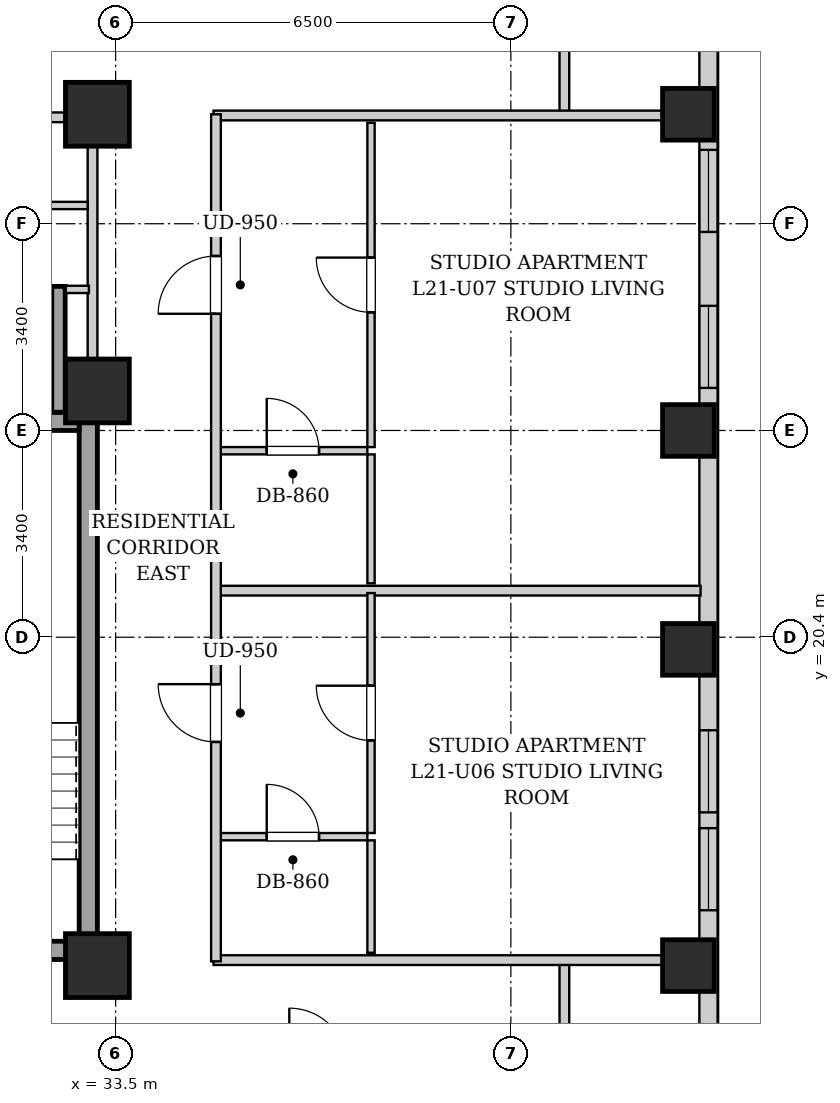
"""IFC4 building model, lengths in metres.
Left out: names, types, materials, properties, quantities, classifications, styles, units other than length and angle.
Written with IfcOpenShell. Run it as: python <this file> out.ifc"""

import sys

from ifc_helpers import new_model, si_unit, direction, frame, frame_2d, origin, origin_2d, place, context, subcontext, project, spatial, rectangle, extrude, element, fill, save


model = new_model("IFC4")
c1 = context("Model", 3, precision=1e-05, world=origin(), true_north=direction((0.0, 1.0)))
c2 = subcontext(c1, "Body", "Model", "MODEL_VIEW")
j1 = project(units=[si_unit("LENGTHUNIT", "METRE"), si_unit("PLANEANGLEUNIT", "RADIAN")], contexts=[c1])
p1 = place(None, origin())
s1 = spatial("IfcSite", under=j1, at=p1, CompositionType="ELEMENT")
p2 = place(p1, origin())
s2 = spatial("IfcBuilding", under=s1, at=p2, CompositionType="ELEMENT")
p3 = place(p2, frame((0.0, 0.0, 78.3)))
s3 = spatial("IfcBuildingStorey", under=s2, at=p3, CompositionType="ELEMENT", Elevation=78.3)
for number, where, z_axis, x_axis in (
    (1, (42.92, 15.0, 0.0), (0.0, 0.0, 1.0), (1.0, 0.0, 0.0)),
    (2, (42.92, 20.2, 0.0), (0.0, 0.0, 1.0), (1.0, 0.0, 0.0)),
    (3, (42.92, 23.8, 0.0), (0.0, 0.0, 1.0), (1.0, 0.0, 0.0)),
    (4, (42.92, 29.0, 0.0), (0.0, 0.0, 1.0), (1.0, 0.0, 0.0)),
):
    element("IfcColumn", number, at=place(p3, frame(where, z_axis=z_axis, x_axis=x_axis)), inside=s3, PredefinedType="COLUMN", context=c2, shape_type="SweptSolid", body=[
        extrude(rectangle(XDim=0.85, YDim=0.85, at=origin_2d()), origin(), (0.0, 0.0, 1.0), 3.2),
    ])
for number, where, z_axis, x_axis in (
    (5, (33.2, 15.0, 0.0), (0.0, 0.0, 1.0), (1.0, 0.0, 0.0)),
    (6, (33.2, 29.0, 0.0), (0.0, 0.0, 1.0), (1.0, 0.0, 0.0)),
    (7, (33.2, 24.45, 0.0), (0.0, 0.0, 1.0), (1.0, 0.0, 0.0)),
):
    element("IfcColumn", number, at=place(p3, frame(where, z_axis=z_axis, x_axis=x_axis)), inside=s3, PredefinedType="COLUMN", context=c2, shape_type="SweptSolid", body=[
        extrude(rectangle(XDim=1.05, YDim=1.05, at=origin_2d()), origin(), (0.0, 0.0, 1.0), 3.2),
    ])
p4 = place(p3, frame((43.25, 40.8, 0.0), z_axis=(0.0, 0.0, 1.0), x_axis=(0.0, -1.0, 0.0)))
e8 = element("IfcWall", 8, at=p4, inside=s3, PredefinedType="SOLIDWALL", context=c2, shape_type="SweptSolid", body=[
    extrude(rectangle(XDim=38.3, YDim=0.3, at=frame_2d((19.15, 0.0))), origin(), (0.0, 0.0, 1.0), 2.94),
])
p5 = place(p4, frame((33.495, 0.0, 0.55)))
e9 = element("IfcOpeningElement", 9, at=p5, cuts=e8, PredefinedType="OPENING", context=c2, shape_type="SweptSolid", body=[
    extrude(rectangle(XDim=1.35, YDim=1.2, at=frame_2d((0.675, 0.6))), frame((0.0, 0.16, 0.0), z_axis=(0.0, -1.0, 0.0), x_axis=(1.0, 0.0, 0.0)), (0.0, 0.0, 1.0), 0.32),
])
p6 = place(p4, frame((31.785, 0.0, 0.55)))
e10 = element("IfcOpeningElement", 10, at=p6, cuts=e8, PredefinedType="OPENING", context=c2, shape_type="SweptSolid", body=[
    extrude(rectangle(XDim=1.35, YDim=1.2, at=frame_2d((0.675, 0.6))), frame((0.0, 0.16, 0.0), z_axis=(0.0, -1.0, 0.0), x_axis=(1.0, 0.0, 0.0)), (0.0, 0.0, 1.0), 0.32),
])
p7 = place(p4, frame((21.93, 0.0, 0.55)))
e11 = element("IfcOpeningElement", 11, at=p7, cuts=e8, PredefinedType="OPENING", context=c2, shape_type="SweptSolid", body=[
    extrude(rectangle(XDim=1.35, YDim=1.2, at=frame_2d((0.675, 0.6))), frame((0.0, 0.16, 0.0), z_axis=(0.0, -1.0, 0.0), x_axis=(1.0, 0.0, 0.0)), (0.0, 0.0, 1.0), 0.32),
])
p8 = place(p4, frame((23.54, 0.0, 0.55)))
e12 = element("IfcOpeningElement", 12, at=p8, cuts=e8, PredefinedType="OPENING", context=c2, shape_type="SweptSolid", body=[
    extrude(rectangle(XDim=1.35, YDim=1.2, at=frame_2d((0.675, 0.6))), frame((0.0, 0.16, 0.0), z_axis=(0.0, -1.0, 0.0), x_axis=(1.0, 0.0, 0.0)), (0.0, 0.0, 1.0), 0.32),
])
p9 = place(p4, frame((14.95, 0.0, 0.55)))
e13 = element("IfcOpeningElement", 13, at=p9, cuts=e8, PredefinedType="OPENING", context=c2, shape_type="SweptSolid", body=[
    extrude(rectangle(XDim=1.35, YDim=1.2, at=frame_2d((0.675, 0.6))), frame((0.0, 0.16, 0.0), z_axis=(0.0, -1.0, 0.0), x_axis=(1.0, 0.0, 0.0)), (0.0, 0.0, 1.0), 0.32),
])
p10 = place(p4, frame((12.385, 0.0, 0.55)))
e14 = element("IfcOpeningElement", 14, at=p10, cuts=e8, PredefinedType="OPENING", context=c2, shape_type="SweptSolid", body=[
    extrude(rectangle(XDim=1.35, YDim=1.2, at=frame_2d((0.675, 0.6))), frame((0.0, 0.16, 0.0), z_axis=(0.0, -1.0, 0.0), x_axis=(1.0, 0.0, 0.0)), (0.0, 0.0, 1.0), 0.32),
])
p11 = place(p3, frame((33.05, 15.1, 0.0), z_axis=(0.0, 0.0, 1.0), x_axis=(0.0, 1.0, 0.0)))
e15 = element("IfcWall", 15, at=p11, inside=s3, PredefinedType="SHEAR", context=c2, shape_type="SweptSolid", body=[
    extrude(rectangle(XDim=9.0, YDim=0.3, at=frame_2d((4.5, 0.0))), origin(), (0.0, 0.0, 1.0), 2.94),
])
p12 = place(p3, frame((30.05, 23.95, 0.0), z_axis=(0.0, 0.0, 1.0), x_axis=(1.0, 0.0, 0.0)))
e16 = element("IfcWall", 16, at=p12, inside=s3, PredefinedType="SHEAR", context=c2, shape_type="SweptSolid", body=[
    extrude(rectangle(XDim=2.85, YDim=0.3, at=frame_2d((1.425, 0.0))), origin(), (0.0, 0.0, 1.0), 2.94),
])
p13 = place(p3, frame((30.05, 15.25, 0.0), z_axis=(0.0, 0.0, 1.0), x_axis=(1.0, 0.0, 0.0)))
e17 = element("IfcWall", 17, at=p13, inside=s3, PredefinedType="SHEAR", context=c2, shape_type="SweptSolid", body=[
    extrude(rectangle(XDim=2.85, YDim=0.3, at=frame_2d((1.425, 0.0))), origin(), (0.0, 0.0, 1.0), 2.94),
])
p14 = place(p13, frame((0.86, 0.0, 0.0)))
e18 = element("IfcOpeningElement", 18, at=p14, cuts=e17, PredefinedType="OPENING", context=c2, shape_type="SweptSolid", body=[
    extrude(rectangle(XDim=1.1, YDim=2.05, at=frame_2d((0.55, 1.025))), frame((0.0, 0.16, 0.0), z_axis=(0.0, -1.0, 0.0), x_axis=(1.0, 0.0, 0.0)), (0.0, 0.0, 1.0), 0.32),
])
p15 = place(p3, frame((32.56, 24.1, 0.0), z_axis=(0.0, 0.0, 1.0), x_axis=(0.0, 1.0, 0.0)))
e19 = element("IfcWall", 19, at=p15, inside=s3, PredefinedType="SHEAR", context=c2, shape_type="SweptSolid", body=[
    extrude(rectangle(XDim=2.07, YDim=0.22, at=frame_2d((1.035, 0.0))), origin(), (0.0, 0.0, 1.0), 2.94),
])
p16 = place(p3, frame((33.12, 24.12, 0.0), z_axis=(0.0, 0.0, 1.0), x_axis=(0.0, 1.0, 0.0)))
e20 = element("IfcWall", 20, at=p16, inside=s3, PredefinedType="PARTITIONING", context=c2, shape_type="SweptSolid", body=[
    extrude(rectangle(XDim=4.76, YDim=0.16, at=frame_2d((2.38, 0.0))), origin(), (0.0, 0.0, 1.0), 2.275),
])
p17 = place(p3, frame((32.68, 26.12, 0.0), z_axis=(0.0, 0.0, 1.0), x_axis=(1.0, 0.0, 0.0)))
e21 = element("IfcWall", 21, at=p17, inside=s3, PredefinedType="PARTITIONING", context=c2, shape_type="SweptSolid", body=[
    extrude(rectangle(XDim=0.38, YDim=0.12, at=frame_2d((0.19, 0.0))), origin(), (0.0, 0.0, 1.0), 2.94),
])
p18 = place(p3, frame((30.16, 27.5, 0.0), z_axis=(0.0, 0.0, 1.0), x_axis=(1.0, 0.0, 0.0)))
e22 = element("IfcWall", 22, at=p18, inside=s3, PredefinedType="PARTITIONING", context=c2, shape_type="SweptSolid", body=[
    extrude(rectangle(XDim=2.88, YDim=0.12, at=frame_2d((1.44, 0.0))), origin(), (0.0, 0.0, 1.0), 2.94),
])
p19 = place(p18, frame((0.97, 0.0, 0.0)))
e23 = element("IfcOpeningElement", 23, at=p19, cuts=e22, PredefinedType="OPENING", context=c2, shape_type="SweptSolid", body=[
    extrude(rectangle(XDim=0.86, YDim=2.05, at=frame_2d((0.43, 1.025))), frame((0.0, 0.07, 0.0), z_axis=(0.0, -1.0, 0.0), x_axis=(1.0, 0.0, 0.0)), (0.0, 0.0, 1.0), 0.14),
])
p20 = place(p3, frame((30.08, 28.95, 0.0), z_axis=(0.0, 0.0, 1.0), x_axis=(1.0, 0.0, 0.0)))
e24 = element("IfcWall", 24, at=p20, inside=s3, PredefinedType="PARTITIONING", context=c2, shape_type="SweptSolid", body=[
    extrude(rectangle(XDim=2.96, YDim=0.16, at=frame_2d((1.48, 0.0))), origin(), (0.0, 0.0, 1.0), 2.94),
])
p21 = place(p20, frame((1.045, 0.0, 0.0)))
e25 = element("IfcOpeningElement", 25, at=p21, cuts=e24, PredefinedType="OPENING", context=c2, shape_type="SweptSolid", body=[
    extrude(rectangle(XDim=0.86, YDim=2.05, at=frame_2d((0.43, 1.025))), frame((0.0, 0.09, 0.0), z_axis=(0.0, -1.0, 0.0), x_axis=(1.0, 0.0, 0.0)), (0.0, 0.0, 1.0), 0.18),
])
for number, where, z_axis, x_axis in (
    (26, (40.88, 13.35, 0.0), (0.0, 0.0, 1.0), (0.0, 1.0, 0.0)),
    (27, (40.88, 28.98, 0.0), (0.0, 0.0, 1.0), (0.0, 1.0, 0.0)),
):
    element("IfcWall", number, at=place(p3, frame(where, z_axis=z_axis, x_axis=x_axis)), inside=s3, PredefinedType="PARTITIONING", context=c2, shape_type="SweptSolid", body=[
        extrude(rectangle(XDim=1.74, YDim=0.16, at=frame_2d((0.87, 0.0))), origin(), (0.0, 0.0, 1.0), 2.94),
    ])
for number, where, z_axis, x_axis in (
    (28, (35.11, 15.09, 0.0), (0.0, 0.0, 1.0), (1.0, 0.0, 0.0)),
    (29, (35.11, 28.98, 0.0), (0.0, 0.0, 1.0), (1.0, 0.0, 0.0)),
):
    element("IfcWall", number, at=place(p3, frame(where, z_axis=z_axis, x_axis=x_axis)), inside=s3, PredefinedType="PARTITIONING", context=c2, shape_type="SweptSolid", body=[
        extrude(rectangle(XDim=8.01, YDim=0.16, at=frame_2d((4.005, 0.0))), origin(), (0.0, 0.0, 1.0), 2.309),
    ])
p22 = place(p3, frame((35.19, 21.166, 0.0), z_axis=(0.0, 0.0, 1.0), x_axis=(1.0, 0.0, 0.0)))
e30 = element("IfcWall", 30, at=p22, inside=s3, PredefinedType="PARTITIONING", context=c2, shape_type="SweptSolid", body=[
    extrude(rectangle(XDim=7.93, YDim=0.16, at=frame_2d((3.965, 0.0))), origin(), (0.0, 0.0, 1.0), 2.94),
])
p23 = place(p3, frame((35.19, 17.12, 0.0), z_axis=(0.0, 0.0, 1.0), x_axis=(1.0, 0.0, 0.0)))
e31 = element("IfcWall", 31, at=p23, inside=s3, PredefinedType="PARTITIONING", context=c2, shape_type="SweptSolid", body=[
    extrude(rectangle(XDim=2.45, YDim=0.12, at=frame_2d((1.225, 0.0))), origin(), (0.0, 0.0, 1.0), 2.94),
])
p24 = place(p23, frame((0.795, 0.0, 0.0)))
e32 = element("IfcOpeningElement", 32, at=p24, cuts=e31, PredefinedType="OPENING", context=c2, shape_type="SweptSolid", body=[
    extrude(rectangle(XDim=0.86, YDim=2.05, at=frame_2d((0.43, 1.025))), frame((0.0, 0.07, 0.0), z_axis=(0.0, -1.0, 0.0), x_axis=(1.0, 0.0, 0.0)), (0.0, 0.0, 1.0), 0.14),
])
p25 = place(p3, frame((37.7, 15.21, 0.0), z_axis=(0.0, 0.0, 1.0), x_axis=(0.0, 1.0, 0.0)))
e33 = element("IfcWall", 33, at=p25, inside=s3, PredefinedType="PARTITIONING", context=c2, shape_type="SweptSolid", body=[
    extrude(rectangle(XDim=1.85, YDim=0.12, at=frame_2d((0.925, 0.0))), origin(), (0.0, 0.0, 1.0), 2.94),
])
p26 = place(p3, frame((37.7, 17.18, 0.0), z_axis=(0.0, 0.0, 1.0), x_axis=(0.0, 1.0, 0.0)))
e34 = element("IfcWall", 34, at=p26, inside=s3, PredefinedType="PARTITIONING", context=c2, shape_type="SweptSolid", body=[
    extrude(rectangle(XDim=3.946, YDim=0.12, at=frame_2d((1.973, 0.0))), origin(), (0.0, 0.0, 1.0), 2.94),
])
p27 = place(p26, frame((1.523, 0.0, 0.0)))
e35 = element("IfcOpeningElement", 35, at=p27, cuts=e34, PredefinedType="OPENING", context=c2, shape_type="SweptSolid", body=[
    extrude(rectangle(XDim=0.9, YDim=2.05, at=frame_2d((0.45, 1.025))), frame((0.0, 0.07, 0.0), z_axis=(0.0, -1.0, 0.0), x_axis=(1.0, 0.0, 0.0)), (0.0, 0.0, 1.0), 0.14),
])
p28 = place(p3, frame((35.19, 23.467, 0.0), z_axis=(0.0, 0.0, 1.0), x_axis=(1.0, 0.0, 0.0)))
e36 = element("IfcWall", 36, at=p28, inside=s3, PredefinedType="PARTITIONING", context=c2, shape_type="SweptSolid", body=[
    extrude(rectangle(XDim=2.45, YDim=0.12, at=frame_2d((1.225, 0.0))), origin(), (0.0, 0.0, 1.0), 2.94),
])
p29 = place(p28, frame((0.795, 0.0, 0.0)))
e37 = element("IfcOpeningElement", 37, at=p29, cuts=e36, PredefinedType="OPENING", context=c2, shape_type="SweptSolid", body=[
    extrude(rectangle(XDim=0.86, YDim=2.05, at=frame_2d((0.43, 1.025))), frame((0.0, 0.07, 0.0), z_axis=(0.0, -1.0, 0.0), x_axis=(1.0, 0.0, 0.0)), (0.0, 0.0, 1.0), 0.14),
])
p30 = place(p3, frame((37.7, 21.286, 0.0), z_axis=(0.0, 0.0, 1.0), x_axis=(0.0, 1.0, 0.0)))
e38 = element("IfcWall", 38, at=p30, inside=s3, PredefinedType="PARTITIONING", context=c2, shape_type="SweptSolid", body=[
    extrude(rectangle(XDim=2.121, YDim=0.12, at=frame_2d((1.061, 0.0))), origin(), (0.0, 0.0, 1.0), 2.94),
])
p31 = place(p3, frame((37.7, 23.527, 0.0), z_axis=(0.0, 0.0, 1.0), x_axis=(0.0, 1.0, 0.0)))
e39 = element("IfcWall", 39, at=p31, inside=s3, PredefinedType="PARTITIONING", context=c2, shape_type="SweptSolid", body=[
    extrude(rectangle(XDim=5.333, YDim=0.12, at=frame_2d((2.667, 0.0))), origin(), (0.0, 0.0, 1.0), 2.94),
])
p32 = place(p31, frame((2.216, 0.0, 0.0)))
e40 = element("IfcOpeningElement", 40, at=p32, cuts=e39, PredefinedType="OPENING", context=c2, shape_type="SweptSolid", body=[
    extrude(rectangle(XDim=0.9, YDim=2.05, at=frame_2d((0.45, 1.025))), frame((0.0, 0.07, 0.0), z_axis=(0.0, -1.0, 0.0), x_axis=(1.0, 0.0, 0.0)), (0.0, 0.0, 1.0), 0.14),
])
p33 = place(p3, frame((35.15, 15.07, 0.0), z_axis=(0.0, 0.0, 1.0), x_axis=(0.0, 1.0, 0.0)))
e41 = element("IfcWall", 41, at=p33, inside=s3, PredefinedType="PARTITIONING", context=c2, shape_type="SweptSolid", body=[
    extrude(rectangle(XDim=13.93, YDim=0.16, at=frame_2d((6.965, 0.0))), origin(), (0.0, 0.0, 1.0), 2.94),
])
p34 = place(p33, frame((3.608, 0.0, 0.0)))
e42 = element("IfcOpeningElement", 42, at=p34, cuts=e41, PredefinedType="OPENING", context=c2, shape_type="SweptSolid", body=[
    extrude(rectangle(XDim=0.95, YDim=2.1, at=frame_2d((0.475, 1.05))), frame((0.0, 0.09, 0.0), z_axis=(0.0, -1.0, 0.0), x_axis=(1.0, 0.0, 0.0)), (0.0, 0.0, 1.0), 0.18),
])
p35 = place(p33, frame((10.649, 0.0, 0.0)))
e43 = element("IfcOpeningElement", 43, at=p35, cuts=e41, PredefinedType="OPENING", context=c2, shape_type="SweptSolid", body=[
    extrude(rectangle(XDim=0.95, YDim=2.1, at=frame_2d((0.475, 1.05))), frame((0.0, 0.09, 0.0), z_axis=(0.0, -1.0, 0.0), x_axis=(1.0, 0.0, 0.0)), (0.0, 0.0, 1.0), 0.18),
])
p36 = place(p24, origin())
e44 = element("IfcDoor", 44, at=p36, inside=s3, OperationType="SINGLE_SWING_LEFT", PredefinedType="DOOR", context=c2, shape_type="SweptSolid", body=[
    extrude(rectangle(XDim=0.86, YDim=2.05, at=frame_2d((0.43, 1.025))), frame((0.0, 0.025, 0.0), z_axis=(0.0, -1.0, 0.0), x_axis=(1.0, 0.0, 0.0)), (0.0, 0.0, 1.0), 0.05),
])
fill(e32, e44)
p37 = place(p27, origin())
e45 = element("IfcDoor", 45, at=p37, inside=s3, OperationType="SINGLE_SWING_RIGHT", PredefinedType="DOOR", context=c2, shape_type="SweptSolid", body=[
    extrude(rectangle(XDim=0.9, YDim=2.05, at=frame_2d((0.45, 1.025))), frame((0.0, 0.025, 0.0), z_axis=(0.0, -1.0, 0.0), x_axis=(1.0, 0.0, 0.0)), (0.0, 0.0, 1.0), 0.05),
])
fill(e35, e45)
p38 = place(p29, origin())
e46 = element("IfcDoor", 46, at=p38, inside=s3, OperationType="SINGLE_SWING_LEFT", PredefinedType="DOOR", context=c2, shape_type="SweptSolid", body=[
    extrude(rectangle(XDim=0.86, YDim=2.05, at=frame_2d((0.43, 1.025))), frame((0.0, 0.025, 0.0), z_axis=(0.0, -1.0, 0.0), x_axis=(1.0, 0.0, 0.0)), (0.0, 0.0, 1.0), 0.05),
])
fill(e37, e46)
p39 = place(p32, origin())
e47 = element("IfcDoor", 47, at=p39, inside=s3, OperationType="SINGLE_SWING_RIGHT", PredefinedType="DOOR", context=c2, shape_type="SweptSolid", body=[
    extrude(rectangle(XDim=0.9, YDim=2.05, at=frame_2d((0.45, 1.025))), frame((0.0, 0.025, 0.0), z_axis=(0.0, -1.0, 0.0), x_axis=(1.0, 0.0, 0.0)), (0.0, 0.0, 1.0), 0.05),
])
fill(e40, e47)
p40 = place(p34, origin())
e48 = element("IfcDoor", 48, at=p40, inside=s3, OperationType="SINGLE_SWING_RIGHT", PredefinedType="DOOR", context=c2, shape_type="SweptSolid", body=[
    extrude(rectangle(XDim=0.95, YDim=2.1, at=frame_2d((0.475, 1.05))), frame((0.0, 0.025, 0.0), z_axis=(0.0, -1.0, 0.0), x_axis=(1.0, 0.0, 0.0)), (0.0, 0.0, 1.0), 0.05),
])
fill(e42, e48)
p41 = place(p35, origin())
e49 = element("IfcDoor", 49, at=p41, inside=s3, OperationType="SINGLE_SWING_LEFT", PredefinedType="DOOR", context=c2, shape_type="SweptSolid", body=[
    extrude(rectangle(XDim=0.95, YDim=2.1, at=frame_2d((0.475, 1.05))), frame((0.0, 0.025, 0.0), z_axis=(0.0, -1.0, 0.0), x_axis=(1.0, 0.0, 0.0)), (0.0, 0.0, 1.0), 0.05),
])
fill(e43, e49)
p42 = place(p7, origin())
e50 = element("IfcWindow", 50, at=p42, inside=s3, PartitioningType="SINGLE_PANEL", PredefinedType="WINDOW", context=c2, shape_type="SweptSolid", body=[
    extrude(rectangle(XDim=1.35, YDim=1.2, at=frame_2d((0.675, 0.6))), frame((0.0, 0.03, 0.0), z_axis=(0.0, -1.0, 0.0), x_axis=(1.0, 0.0, 0.0)), (0.0, 0.0, 1.0), 0.06),
])
fill(e11, e50)
p43 = place(p8, origin())
e51 = element("IfcWindow", 51, at=p43, inside=s3, PartitioningType="SINGLE_PANEL", PredefinedType="WINDOW", context=c2, shape_type="SweptSolid", body=[
    extrude(rectangle(XDim=1.35, YDim=1.2, at=frame_2d((0.675, 0.6))), frame((0.0, 0.03, 0.0), z_axis=(0.0, -1.0, 0.0), x_axis=(1.0, 0.0, 0.0)), (0.0, 0.0, 1.0), 0.06),
])
fill(e12, e51)
p44 = place(p9, origin())
e52 = element("IfcWindow", 52, at=p44, inside=s3, PartitioningType="SINGLE_PANEL", PredefinedType="WINDOW", context=c2, shape_type="SweptSolid", body=[
    extrude(rectangle(XDim=1.35, YDim=1.2, at=frame_2d((0.675, 0.6))), frame((0.0, 0.03, 0.0), z_axis=(0.0, -1.0, 0.0), x_axis=(1.0, 0.0, 0.0)), (0.0, 0.0, 1.0), 0.06),
])
fill(e13, e52)
p45 = place(p10, origin())
e53 = element("IfcWindow", 53, at=p45, inside=s3, PartitioningType="SINGLE_PANEL", PredefinedType="WINDOW", context=c2, shape_type="SweptSolid", body=[
    extrude(rectangle(XDim=1.35, YDim=1.2, at=frame_2d((0.675, 0.6))), frame((0.0, 0.03, 0.0), z_axis=(0.0, -1.0, 0.0), x_axis=(1.0, 0.0, 0.0)), (0.0, 0.0, 1.0), 0.06),
])
fill(e14, e53)
save(model, sys.argv[1])
